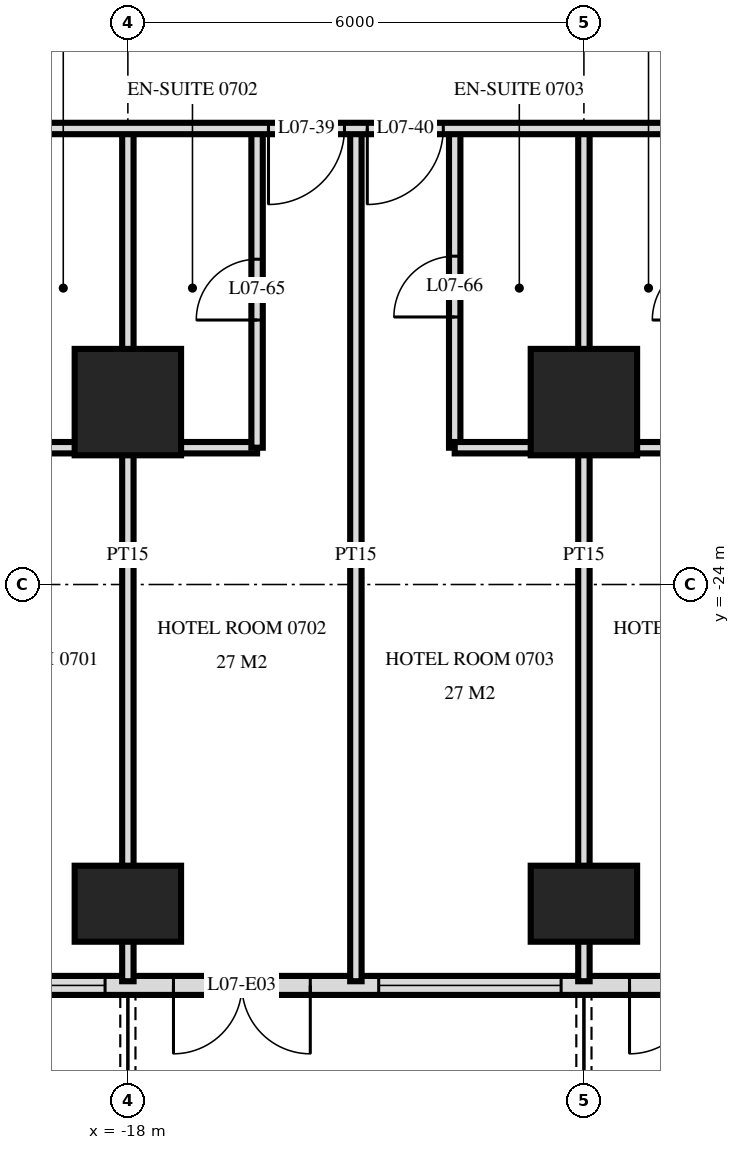
"""IFC4 building model, lengths in metres.
Left out: names, types, materials, properties, quantities, classifications, styles, units other than length and angle.
Written with IfcOpenShell. Run it as: python <this file> out.ifc"""

import sys

from ifc_helpers import new_model, si_unit, direction, frame, frame_2d, origin, origin_2d, place, context, subcontext, project, spatial, rectangle, extrude, element, fill, save


model = new_model("IFC4")
c1 = context("Model", 3, precision=1e-05, world=origin(), true_north=direction((0.0, 1.0)))
c2 = subcontext(c1, "Body", "Model", "MODEL_VIEW")
j1 = project(units=[si_unit("LENGTHUNIT", "METRE"), si_unit("PLANEANGLEUNIT", "RADIAN")], contexts=[c1])
p1 = place(None, origin())
s1 = spatial("IfcSite", under=j1, at=p1, CompositionType="ELEMENT")
p2 = place(p1, origin())
s2 = spatial("IfcBuilding", under=s1, at=p2, CompositionType="ELEMENT")
p3 = place(p2, frame((0.0, 0.0, 34.8)))
s3 = spatial("IfcBuildingStorey", under=s2, at=p3, CompositionType="ELEMENT", Elevation=34.8)
p4 = place(p3, frame((-18.0, -28.2, 0.0), z_axis=(0.0, 0.0, 1.0), x_axis=(1.0, 0.0, 0.0)))
e1 = element("IfcColumn", 1, at=p4, inside=s3, PredefinedType="COLUMN", context=c2, shape_type="SweptSolid", body=[
    extrude(rectangle(XDim=1.4, YDim=1.0, at=origin_2d()), origin(), (0.0, 0.0, 1.0), 3.6),
])
p5 = place(p3, frame((-18.0, -21.6, 0.0), z_axis=(0.0, 0.0, 1.0), x_axis=(1.0, 0.0, 0.0)))
e2 = element("IfcColumn", 2, at=p5, inside=s3, PredefinedType="COLUMN", context=c2, shape_type="SweptSolid", body=[
    extrude(rectangle(XDim=1.4, YDim=1.4, at=origin_2d()), origin(), (0.0, 0.0, 1.0), 3.6),
])
p6 = place(p3, frame((-12.0, -28.2, 0.0), z_axis=(0.0, 0.0, 1.0), x_axis=(1.0, 0.0, 0.0)))
e3 = element("IfcColumn", 3, at=p6, inside=s3, PredefinedType="COLUMN", context=c2, shape_type="SweptSolid", body=[
    extrude(rectangle(XDim=1.4, YDim=1.0, at=origin_2d()), origin(), (0.0, 0.0, 1.0), 3.6),
])
p7 = place(p3, frame((-12.0, -21.6, 0.0), z_axis=(0.0, 0.0, 1.0), x_axis=(1.0, 0.0, 0.0)))
e4 = element("IfcColumn", 4, at=p7, inside=s3, PredefinedType="COLUMN", context=c2, shape_type="SweptSolid", body=[
    extrude(rectangle(XDim=1.4, YDim=1.4, at=origin_2d()), origin(), (0.0, 0.0, 1.0), 3.6),
])
p8 = place(p3, frame((-28.775, -29.275, 0.0), z_axis=(0.0, 0.0, 1.0), x_axis=(1.0, 0.0, 0.0)))
e5 = element("IfcWall", 5, at=p8, inside=s3, PredefinedType="SOLIDWALL", context=c2, shape_type="SweptSolid", body=[
    extrude(rectangle(XDim=57.551, YDim=0.25, at=frame_2d((28.775, 0.0))), origin(), (0.0, 0.0, 1.0), 3.32),
])
p9 = place(p8, frame((0.575, 0.0, 0.0)))
e6 = element("IfcOpeningElement", 6, at=p9, cuts=e5, PredefinedType="OPENING", context=c2, shape_type="SweptSolid", body=[
    extrude(rectangle(XDim=1.8, YDim=2.4, at=frame_2d((0.9, 1.2))), frame((0.0, 0.135, 0.0), z_axis=(0.0, -1.0, 0.0), x_axis=(1.0, 0.0, 0.0)), (0.0, 0.0, 1.0), 0.27),
])
p10 = place(p8, frame((5.375, 0.0, 0.0)))
e7 = element("IfcOpeningElement", 7, at=p10, cuts=e5, PredefinedType="OPENING", context=c2, shape_type="SweptSolid", body=[
    extrude(rectangle(XDim=1.8, YDim=2.4, at=frame_2d((0.9, 1.2))), frame((0.0, 0.135, 0.0), z_axis=(0.0, -1.0, 0.0), x_axis=(1.0, 0.0, 0.0)), (0.0, 0.0, 1.0), 0.27),
])
p11 = place(p8, frame((8.075, 0.0, 0.3)))
e8 = element("IfcOpeningElement", 8, at=p11, cuts=e5, PredefinedType="OPENING", context=c2, shape_type="SweptSolid", body=[
    extrude(rectangle(XDim=2.4, YDim=2.1, at=frame_2d((1.2, 1.05))), frame((0.0, 0.135, 0.0), z_axis=(0.0, -1.0, 0.0), x_axis=(1.0, 0.0, 0.0)), (0.0, 0.0, 1.0), 0.27),
])
p12 = place(p8, frame((11.375, 0.0, 0.0)))
e9 = element("IfcOpeningElement", 9, at=p12, cuts=e5, PredefinedType="OPENING", context=c2, shape_type="SweptSolid", body=[
    extrude(rectangle(XDim=1.8, YDim=2.4, at=frame_2d((0.9, 1.2))), frame((0.0, 0.135, 0.0), z_axis=(0.0, -1.0, 0.0), x_axis=(1.0, 0.0, 0.0)), (0.0, 0.0, 1.0), 0.27),
])
p13 = place(p8, frame((14.075, 0.0, 0.3)))
e10 = element("IfcOpeningElement", 10, at=p13, cuts=e5, PredefinedType="OPENING", context=c2, shape_type="SweptSolid", body=[
    extrude(rectangle(XDim=2.4, YDim=2.1, at=frame_2d((1.2, 1.05))), frame((0.0, 0.135, 0.0), z_axis=(0.0, -1.0, 0.0), x_axis=(1.0, 0.0, 0.0)), (0.0, 0.0, 1.0), 0.27),
])
p14 = place(p8, frame((17.375, 0.0, 0.0)))
e11 = element("IfcOpeningElement", 11, at=p14, cuts=e5, PredefinedType="OPENING", context=c2, shape_type="SweptSolid", body=[
    extrude(rectangle(XDim=1.8, YDim=2.4, at=frame_2d((0.9, 1.2))), frame((0.0, 0.135, 0.0), z_axis=(0.0, -1.0, 0.0), x_axis=(1.0, 0.0, 0.0)), (0.0, 0.0, 1.0), 0.27),
])
p15 = place(p8, frame((20.075, 0.0, 0.3)))
e12 = element("IfcOpeningElement", 12, at=p15, cuts=e5, PredefinedType="OPENING", context=c2, shape_type="SweptSolid", body=[
    extrude(rectangle(XDim=2.4, YDim=2.1, at=frame_2d((1.2, 1.05))), frame((0.0, 0.135, 0.0), z_axis=(0.0, -1.0, 0.0), x_axis=(1.0, 0.0, 0.0)), (0.0, 0.0, 1.0), 0.27),
])
p16 = place(p8, frame((23.075, 0.0, 0.3)))
e13 = element("IfcOpeningElement", 13, at=p16, cuts=e5, PredefinedType="OPENING", context=c2, shape_type="SweptSolid", body=[
    extrude(rectangle(XDim=2.4, YDim=2.1, at=frame_2d((1.2, 1.05))), frame((0.0, 0.135, 0.0), z_axis=(0.0, -1.0, 0.0), x_axis=(1.0, 0.0, 0.0)), (0.0, 0.0, 1.0), 0.27),
])
p17 = place(p8, frame((26.375, 0.0, 0.0)))
e14 = element("IfcOpeningElement", 14, at=p17, cuts=e5, PredefinedType="OPENING", context=c2, shape_type="SweptSolid", body=[
    extrude(rectangle(XDim=1.8, YDim=2.4, at=frame_2d((0.9, 1.2))), frame((0.0, 0.135, 0.0), z_axis=(0.0, -1.0, 0.0), x_axis=(1.0, 0.0, 0.0)), (0.0, 0.0, 1.0), 0.27),
])
p18 = place(p8, frame((29.375, 0.0, 0.0)))
e15 = element("IfcOpeningElement", 15, at=p18, cuts=e5, PredefinedType="OPENING", context=c2, shape_type="SweptSolid", body=[
    extrude(rectangle(XDim=1.8, YDim=2.4, at=frame_2d((0.9, 1.2))), frame((0.0, 0.135, 0.0), z_axis=(0.0, -1.0, 0.0), x_axis=(1.0, 0.0, 0.0)), (0.0, 0.0, 1.0), 0.27),
])
p19 = place(p8, frame((32.075, 0.0, 0.3)))
e16 = element("IfcOpeningElement", 16, at=p19, cuts=e5, PredefinedType="OPENING", context=c2, shape_type="SweptSolid", body=[
    extrude(rectangle(XDim=2.4, YDim=2.1, at=frame_2d((1.2, 1.05))), frame((0.0, 0.135, 0.0), z_axis=(0.0, -1.0, 0.0), x_axis=(1.0, 0.0, 0.0)), (0.0, 0.0, 1.0), 0.27),
])
p20 = place(p8, frame((35.375, 0.0, 0.0)))
e17 = element("IfcOpeningElement", 17, at=p20, cuts=e5, PredefinedType="OPENING", context=c2, shape_type="SweptSolid", body=[
    extrude(rectangle(XDim=1.8, YDim=2.4, at=frame_2d((0.9, 1.2))), frame((0.0, 0.135, 0.0), z_axis=(0.0, -1.0, 0.0), x_axis=(1.0, 0.0, 0.0)), (0.0, 0.0, 1.0), 0.27),
])
p21 = place(p8, frame((38.075, 0.0, 0.3)))
e18 = element("IfcOpeningElement", 18, at=p21, cuts=e5, PredefinedType="OPENING", context=c2, shape_type="SweptSolid", body=[
    extrude(rectangle(XDim=2.4, YDim=2.1, at=frame_2d((1.2, 1.05))), frame((0.0, 0.135, 0.0), z_axis=(0.0, -1.0, 0.0), x_axis=(1.0, 0.0, 0.0)), (0.0, 0.0, 1.0), 0.27),
])
p22 = place(p8, frame((41.375, 0.0, 0.0)))
e19 = element("IfcOpeningElement", 19, at=p22, cuts=e5, PredefinedType="OPENING", context=c2, shape_type="SweptSolid", body=[
    extrude(rectangle(XDim=1.8, YDim=2.4, at=frame_2d((0.9, 1.2))), frame((0.0, 0.135, 0.0), z_axis=(0.0, -1.0, 0.0), x_axis=(1.0, 0.0, 0.0)), (0.0, 0.0, 1.0), 0.27),
])
p23 = place(p8, frame((44.075, 0.0, 0.3)))
e20 = element("IfcOpeningElement", 20, at=p23, cuts=e5, PredefinedType="OPENING", context=c2, shape_type="SweptSolid", body=[
    extrude(rectangle(XDim=2.4, YDim=2.1, at=frame_2d((1.2, 1.05))), frame((0.0, 0.135, 0.0), z_axis=(0.0, -1.0, 0.0), x_axis=(1.0, 0.0, 0.0)), (0.0, 0.0, 1.0), 0.27),
])
p24 = place(p8, frame((47.375, 0.0, 0.0)))
e21 = element("IfcOpeningElement", 21, at=p24, cuts=e5, PredefinedType="OPENING", context=c2, shape_type="SweptSolid", body=[
    extrude(rectangle(XDim=1.8, YDim=2.4, at=frame_2d((0.9, 1.2))), frame((0.0, 0.135, 0.0), z_axis=(0.0, -1.0, 0.0), x_axis=(1.0, 0.0, 0.0)), (0.0, 0.0, 1.0), 0.27),
])
p25 = place(p8, frame((50.075, 0.0, 0.3)))
e22 = element("IfcOpeningElement", 22, at=p25, cuts=e5, PredefinedType="OPENING", context=c2, shape_type="SweptSolid", body=[
    extrude(rectangle(XDim=2.4, YDim=2.1, at=frame_2d((1.2, 1.05))), frame((0.0, 0.135, 0.0), z_axis=(0.0, -1.0, 0.0), x_axis=(1.0, 0.0, 0.0)), (0.0, 0.0, 1.0), 0.27),
])
p26 = place(p8, frame((53.375, 0.0, 0.0)))
e23 = element("IfcOpeningElement", 23, at=p26, cuts=e5, PredefinedType="OPENING", context=c2, shape_type="SweptSolid", body=[
    extrude(rectangle(XDim=1.8, YDim=2.4, at=frame_2d((0.9, 1.2))), frame((0.0, 0.135, 0.0), z_axis=(0.0, -1.0, 0.0), x_axis=(1.0, 0.0, 0.0)), (0.0, 0.0, 1.0), 0.27),
])
p27 = place(p3, frame((-12.0, -29.22, 0.0), z_axis=(0.0, 0.0, 1.0), x_axis=(0.0, 1.0, 0.0)))
e24 = element("IfcWall", 24, at=p27, inside=s3, PredefinedType="PARTITIONING", context=c2, shape_type="SweptSolid", body=[
    extrude(rectangle(XDim=11.22, YDim=0.15, at=frame_2d((5.61, 0.0))), origin(), (0.0, 0.0, 1.0), 3.32),
])
p28 = place(p3, frame((-13.7, -22.2, 0.0), z_axis=(0.0, 0.0, 1.0), x_axis=(0.0, 1.0, 0.0)))
e25 = element("IfcWall", 25, at=p28, inside=s3, PredefinedType="PARTITIONING", context=c2, shape_type="SweptSolid", body=[
    extrude(rectangle(XDim=4.2, YDim=0.15, at=frame_2d((2.1, 0.0))), origin(), (0.0, 0.0, 1.0), 3.32),
])
p29 = place(p28, frame((1.72, 0.0, 0.0)))
e26 = element("IfcOpeningElement", 26, at=p29, cuts=e25, PredefinedType="OPENING", context=c2, shape_type="SweptSolid", body=[
    extrude(rectangle(XDim=0.8, YDim=2.1, at=frame_2d((0.4, 1.05))), frame((0.0, 0.085, 0.0), z_axis=(0.0, -1.0, 0.0), x_axis=(1.0, 0.0, 0.0)), (0.0, 0.0, 1.0), 0.17),
])
p30 = place(p3, frame((-15.0, -29.22, 0.0), z_axis=(0.0, 0.0, 1.0), x_axis=(0.0, 1.0, 0.0)))
e27 = element("IfcWall", 27, at=p30, inside=s3, PredefinedType="PARTITIONING", context=c2, shape_type="SweptSolid", body=[
    extrude(rectangle(XDim=11.22, YDim=0.15, at=frame_2d((5.61, 0.0))), origin(), (0.0, 0.0, 1.0), 3.32),
])
p31 = place(p3, frame((-16.3, -22.2, 0.0), z_axis=(0.0, 0.0, 1.0), x_axis=(0.0, 1.0, 0.0)))
e28 = element("IfcWall", 28, at=p31, inside=s3, PredefinedType="PARTITIONING", context=c2, shape_type="SweptSolid", body=[
    extrude(rectangle(XDim=4.2, YDim=0.15, at=frame_2d((2.1, 0.0))), origin(), (0.0, 0.0, 1.0), 3.32),
])
p32 = place(p31, frame((1.68, 0.0, 0.0)))
e29 = element("IfcOpeningElement", 29, at=p32, cuts=e28, PredefinedType="OPENING", context=c2, shape_type="SweptSolid", body=[
    extrude(rectangle(XDim=0.8, YDim=2.1, at=frame_2d((0.4, 1.05))), frame((0.0, 0.085, 0.0), z_axis=(0.0, -1.0, 0.0), x_axis=(1.0, 0.0, 0.0)), (0.0, 0.0, 1.0), 0.17),
])
p33 = place(p3, frame((-18.0, -29.22, 0.0), z_axis=(0.0, 0.0, 1.0), x_axis=(0.0, 1.0, 0.0)))
e30 = element("IfcWall", 30, at=p33, inside=s3, PredefinedType="PARTITIONING", context=c2, shape_type="SweptSolid", body=[
    extrude(rectangle(XDim=11.22, YDim=0.15, at=frame_2d((5.61, 0.0))), origin(), (0.0, 0.0, 1.0), 3.32),
])
for number, where, z_axis, x_axis in (
    (31, (-19.7, -22.2, 0.0), (0.0, 0.0, 1.0), (1.0, 0.0, 0.0)),
    (32, (-13.7, -22.2, 0.0), (0.0, 0.0, 1.0), (1.0, 0.0, 0.0)),
):
    element("IfcWall", number, at=place(p3, frame(where, z_axis=z_axis, x_axis=x_axis)), inside=s3, PredefinedType="PARTITIONING", context=c2, shape_type="SweptSolid", body=[
        extrude(rectangle(XDim=3.4, YDim=0.15, at=frame_2d((1.7, 0.0))), origin(), (0.0, 0.0, 1.0), 3.32),
    ])
p34 = place(p3, frame((-33.12, -18.0, 0.0), z_axis=(0.0, 0.0, 1.0), x_axis=(1.0, 0.0, 0.0)))
e33 = element("IfcWall", 33, at=p34, inside=s3, PredefinedType="PARTITIONING", context=c2, shape_type="SweptSolid", body=[
    extrude(rectangle(XDim=66.24, YDim=0.15, at=frame_2d((33.12, 0.0))), origin(), (0.0, 0.0, 1.0), 3.32),
])
p35 = place(p34, frame((12.27, 0.0, 0.0)))
e34 = element("IfcOpeningElement", 34, at=p35, cuts=e33, PredefinedType="OPENING", context=c2, shape_type="SweptSolid", body=[
    extrude(rectangle(XDim=1.0, YDim=2.1, at=frame_2d((0.5, 1.05))), frame((0.0, 0.085, 0.0), z_axis=(0.0, -1.0, 0.0), x_axis=(1.0, 0.0, 0.0)), (0.0, 0.0, 1.0), 0.17),
])
p36 = place(p34, frame((16.97, 0.0, 0.0)))
e35 = element("IfcOpeningElement", 35, at=p36, cuts=e33, PredefinedType="OPENING", context=c2, shape_type="SweptSolid", body=[
    extrude(rectangle(XDim=1.0, YDim=2.1, at=frame_2d((0.5, 1.05))), frame((0.0, 0.085, 0.0), z_axis=(0.0, -1.0, 0.0), x_axis=(1.0, 0.0, 0.0)), (0.0, 0.0, 1.0), 0.17),
])
p37 = place(p34, frame((18.27, 0.0, 0.0)))
e36 = element("IfcOpeningElement", 36, at=p37, cuts=e33, PredefinedType="OPENING", context=c2, shape_type="SweptSolid", body=[
    extrude(rectangle(XDim=1.0, YDim=2.1, at=frame_2d((0.5, 1.05))), frame((0.0, 0.085, 0.0), z_axis=(0.0, -1.0, 0.0), x_axis=(1.0, 0.0, 0.0)), (0.0, 0.0, 1.0), 0.17),
])
p38 = place(p34, frame((22.97, 0.0, 0.0)))
e37 = element("IfcOpeningElement", 37, at=p38, cuts=e33, PredefinedType="OPENING", context=c2, shape_type="SweptSolid", body=[
    extrude(rectangle(XDim=1.0, YDim=2.1, at=frame_2d((0.5, 1.05))), frame((0.0, 0.085, 0.0), z_axis=(0.0, -1.0, 0.0), x_axis=(1.0, 0.0, 0.0)), (0.0, 0.0, 1.0), 0.17),
])
p39 = place(p34, frame((24.27, 0.0, 0.0)))
e38 = element("IfcOpeningElement", 38, at=p39, cuts=e33, PredefinedType="OPENING", context=c2, shape_type="SweptSolid", body=[
    extrude(rectangle(XDim=1.0, YDim=2.1, at=frame_2d((0.5, 1.05))), frame((0.0, 0.085, 0.0), z_axis=(0.0, -1.0, 0.0), x_axis=(1.0, 0.0, 0.0)), (0.0, 0.0, 1.0), 0.17),
])
p40 = place(p34, frame((28.97, 0.0, 0.0)))
e39 = element("IfcOpeningElement", 39, at=p40, cuts=e33, PredefinedType="OPENING", context=c2, shape_type="SweptSolid", body=[
    extrude(rectangle(XDim=1.0, YDim=2.1, at=frame_2d((0.5, 1.05))), frame((0.0, 0.085, 0.0), z_axis=(0.0, -1.0, 0.0), x_axis=(1.0, 0.0, 0.0)), (0.0, 0.0, 1.0), 0.17),
])
p41 = place(p34, frame((30.27, 0.0, 0.0)))
e40 = element("IfcOpeningElement", 40, at=p41, cuts=e33, PredefinedType="OPENING", context=c2, shape_type="SweptSolid", body=[
    extrude(rectangle(XDim=1.0, YDim=2.1, at=frame_2d((0.5, 1.05))), frame((0.0, 0.085, 0.0), z_axis=(0.0, -1.0, 0.0), x_axis=(1.0, 0.0, 0.0)), (0.0, 0.0, 1.0), 0.17),
])
p42 = place(p34, frame((34.97, 0.0, 0.0)))
e41 = element("IfcOpeningElement", 41, at=p42, cuts=e33, PredefinedType="OPENING", context=c2, shape_type="SweptSolid", body=[
    extrude(rectangle(XDim=1.0, YDim=2.1, at=frame_2d((0.5, 1.05))), frame((0.0, 0.085, 0.0), z_axis=(0.0, -1.0, 0.0), x_axis=(1.0, 0.0, 0.0)), (0.0, 0.0, 1.0), 0.17),
])
p43 = place(p34, frame((37.27, 0.0, 0.0)))
e42 = element("IfcOpeningElement", 42, at=p43, cuts=e33, PredefinedType="OPENING", context=c2, shape_type="SweptSolid", body=[
    extrude(rectangle(XDim=1.0, YDim=2.1, at=frame_2d((0.5, 1.05))), frame((0.0, 0.085, 0.0), z_axis=(0.0, -1.0, 0.0), x_axis=(1.0, 0.0, 0.0)), (0.0, 0.0, 1.0), 0.17),
])
p44 = place(p34, frame((43.97, 0.0, 0.0)))
e43 = element("IfcOpeningElement", 43, at=p44, cuts=e33, PredefinedType="OPENING", context=c2, shape_type="SweptSolid", body=[
    extrude(rectangle(XDim=1.0, YDim=2.1, at=frame_2d((0.5, 1.05))), frame((0.0, 0.085, 0.0), z_axis=(0.0, -1.0, 0.0), x_axis=(1.0, 0.0, 0.0)), (0.0, 0.0, 1.0), 0.17),
])
p45 = place(p34, frame((45.27, 0.0, 0.0)))
e44 = element("IfcOpeningElement", 44, at=p45, cuts=e33, PredefinedType="OPENING", context=c2, shape_type="SweptSolid", body=[
    extrude(rectangle(XDim=1.0, YDim=2.1, at=frame_2d((0.5, 1.05))), frame((0.0, 0.085, 0.0), z_axis=(0.0, -1.0, 0.0), x_axis=(1.0, 0.0, 0.0)), (0.0, 0.0, 1.0), 0.17),
])
p46 = place(p34, frame((51.22, 0.0, 0.0)))
e45 = element("IfcOpeningElement", 45, at=p46, cuts=e33, PredefinedType="OPENING", context=c2, shape_type="SweptSolid", body=[
    extrude(rectangle(XDim=1.0, YDim=2.1, at=frame_2d((0.5, 1.05))), frame((0.0, 0.085, 0.0), z_axis=(0.0, -1.0, 0.0), x_axis=(1.0, 0.0, 0.0)), (0.0, 0.0, 1.0), 0.17),
])
p47 = place(p34, frame((54.27, 0.0, 0.0)))
e46 = element("IfcOpeningElement", 46, at=p47, cuts=e33, PredefinedType="OPENING", context=c2, shape_type="SweptSolid", body=[
    extrude(rectangle(XDim=1.0, YDim=2.1, at=frame_2d((0.5, 1.05))), frame((0.0, 0.085, 0.0), z_axis=(0.0, -1.0, 0.0), x_axis=(1.0, 0.0, 0.0)), (0.0, 0.0, 1.0), 0.17),
])
p48 = place(p34, frame((6.07, 0.0, 0.0)))
e47 = element("IfcOpeningElement", 47, at=p48, cuts=e33, PredefinedType="OPENING", context=c2, shape_type="SweptSolid", body=[
    extrude(rectangle(XDim=1.0, YDim=2.1, at=frame_2d((0.5, 1.05))), frame((0.0, 0.085, 0.0), z_axis=(0.0, -1.0, 0.0), x_axis=(1.0, 0.0, 0.0)), (0.0, 0.0, 1.0), 0.17),
])
p49 = place(p34, frame((63.37, 0.0, 0.0)))
e48 = element("IfcOpeningElement", 48, at=p49, cuts=e33, PredefinedType="OPENING", context=c2, shape_type="SweptSolid", body=[
    extrude(rectangle(XDim=1.0, YDim=2.1, at=frame_2d((0.5, 1.05))), frame((0.0, 0.085, 0.0), z_axis=(0.0, -1.0, 0.0), x_axis=(1.0, 0.0, 0.0)), (0.0, 0.0, 1.0), 0.17),
])
p50 = place(p11, origin())
e49 = element("IfcWindow", 49, at=p50, inside=s3, PartitioningType="SINGLE_PANEL", PredefinedType="WINDOW", context=c2, shape_type="SweptSolid", body=[
    extrude(rectangle(XDim=2.4, YDim=2.1, at=frame_2d((1.2, 1.05))), frame((0.0, 0.03, 0.0), z_axis=(0.0, -1.0, 0.0), x_axis=(1.0, 0.0, 0.0)), (0.0, 0.0, 1.0), 0.06),
])
fill(e8, e49)
p51 = place(p12, frame((0.9, 0.0, 0.0), z_axis=(0.0, 0.0, 1.0), x_axis=(-1.0, 0.0, 0.0)))
e50 = element("IfcDoor", 50, at=p51, inside=s3, OperationType="DOUBLE_DOOR_SINGLE_SWING", PredefinedType="DOOR", context=c2, shape_type="SweptSolid", body=[
    extrude(rectangle(XDim=1.8, YDim=2.4, at=frame_2d((0.0, 1.2))), frame((0.0, -0.025, 0.0), z_axis=(0.0, 1.0, 0.0), x_axis=(-1.0, 0.0, 0.0)), (0.0, 0.0, 1.0), 0.05),
])
fill(e9, e50)
p52 = place(p13, origin())
e51 = element("IfcWindow", 51, at=p52, inside=s3, PartitioningType="SINGLE_PANEL", PredefinedType="WINDOW", context=c2, shape_type="SweptSolid", body=[
    extrude(rectangle(XDim=2.4, YDim=2.1, at=frame_2d((1.2, 1.05))), frame((0.0, 0.03, 0.0), z_axis=(0.0, -1.0, 0.0), x_axis=(1.0, 0.0, 0.0)), (0.0, 0.0, 1.0), 0.06),
])
fill(e10, e51)
p53 = place(p14, frame((0.9, 0.0, 0.0), z_axis=(0.0, 0.0, 1.0), x_axis=(-1.0, 0.0, 0.0)))
e52 = element("IfcDoor", 52, at=p53, inside=s3, OperationType="DOUBLE_DOOR_SINGLE_SWING", PredefinedType="DOOR", context=c2, shape_type="SweptSolid", body=[
    extrude(rectangle(XDim=1.8, YDim=2.4, at=frame_2d((0.0, 1.2))), frame((0.0, -0.025, 0.0), z_axis=(0.0, 1.0, 0.0), x_axis=(-1.0, 0.0, 0.0)), (0.0, 0.0, 1.0), 0.05),
])
fill(e11, e52)
p54 = place(p36, frame((0.5, 0.0, 0.0), z_axis=(0.0, 0.0, 1.0), x_axis=(-1.0, 0.0, 0.0)))
e53 = element("IfcDoor", 53, at=p54, inside=s3, OperationType="SINGLE_SWING_LEFT", PredefinedType="DOOR", context=c2, shape_type="SweptSolid", body=[
    extrude(rectangle(XDim=1.0, YDim=2.1, at=frame_2d((0.0, 1.05))), frame((0.0, -0.025, 0.0), z_axis=(0.0, 1.0, 0.0), x_axis=(-1.0, 0.0, 0.0)), (0.0, 0.0, 1.0), 0.05),
])
fill(e35, e53)
p55 = place(p37, frame((0.5, 0.0, 0.0), z_axis=(0.0, 0.0, 1.0), x_axis=(-1.0, 0.0, 0.0)))
e54 = element("IfcDoor", 54, at=p55, inside=s3, OperationType="SINGLE_SWING_LEFT", PredefinedType="DOOR", context=c2, shape_type="SweptSolid", body=[
    extrude(rectangle(XDim=1.0, YDim=2.1, at=frame_2d((0.0, 1.05))), frame((0.0, -0.025, 0.0), z_axis=(0.0, 1.0, 0.0), x_axis=(-1.0, 0.0, 0.0)), (0.0, 0.0, 1.0), 0.05),
])
fill(e36, e54)
p56 = place(p32, origin())
e55 = element("IfcDoor", 55, at=p56, inside=s3, OperationType="SINGLE_SWING_RIGHT", PredefinedType="DOOR", context=c2, shape_type="SweptSolid", body=[
    extrude(rectangle(XDim=0.8, YDim=2.1, at=frame_2d((0.4, 1.05))), frame((0.0, 0.025, 0.0), z_axis=(0.0, -1.0, 0.0), x_axis=(1.0, 0.0, 0.0)), (0.0, 0.0, 1.0), 0.05),
])
fill(e29, e55)
p57 = place(p29, origin())
e56 = element("IfcDoor", 56, at=p57, inside=s3, OperationType="SINGLE_SWING_RIGHT", PredefinedType="DOOR", context=c2, shape_type="SweptSolid", body=[
    extrude(rectangle(XDim=0.8, YDim=2.1, at=frame_2d((0.4, 1.05))), frame((0.0, 0.025, 0.0), z_axis=(0.0, -1.0, 0.0), x_axis=(1.0, 0.0, 0.0)), (0.0, 0.0, 1.0), 0.05),
])
fill(e26, e56)
save(model, sys.argv[1])
